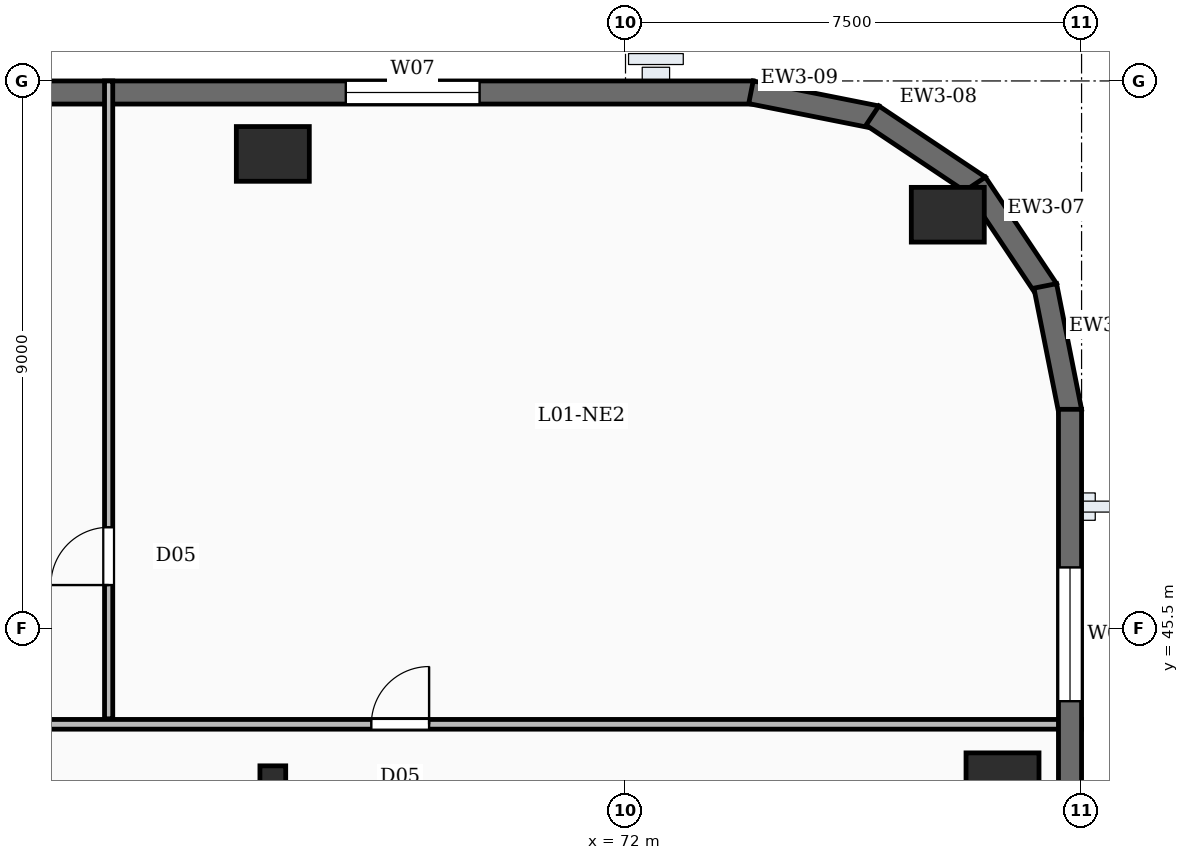
"""IFC4 building model, lengths in metres.
Left out: names, types, materials, properties, quantities, classifications, styles, units other than length and angle.
Written with IfcOpenShell. Run it as: python <this file> out.ifc"""

import sys

from ifc_helpers import new_model, si_unit, direction, frame, frame_2d, origin, origin_2d, place, context, subcontext, project, spatial, rectangle, i_section, extrude, element, fill, save


model = new_model("IFC4")
c1 = context("Model", 3, precision=1e-05, world=origin(), true_north=direction((0.0, 1.0)))
c2 = subcontext(c1, "Body", "Model", "MODEL_VIEW")
j1 = project(units=[si_unit("LENGTHUNIT", "METRE"), si_unit("PLANEANGLEUNIT", "RADIAN")], contexts=[c1])
p1 = place(None, origin())
s1 = spatial("IfcSite", under=j1, at=p1, CompositionType="ELEMENT")
p2 = place(p1, origin())
s2 = spatial("IfcBuilding", under=s1, at=p2, CompositionType="ELEMENT")
p3 = place(p2, frame((0.0, 0.0, 8.0)))
s3 = spatial("IfcBuildingStorey", under=s2, at=p3, CompositionType="ELEMENT", Elevation=8.0)
for number, where, z_axis, x_axis in (
    (1, (78.2, 43.0, -0.35), (0.0, 0.0, 1.0), (1.0, 0.0, 0.0)),
    (2, (77.3, 52.3, -0.35), (0.0, 0.0, 1.0), (1.0, 0.0, 0.0)),
    (3, (66.2, 53.3, -0.35), (0.0, 0.0, 1.0), (1.0, 0.0, 0.0)),
):
    element("IfcColumn", number, at=place(p3, frame(where, z_axis=z_axis, x_axis=x_axis)), inside=s3, PredefinedType="COLUMN", context=c2, shape_type="SweptSolid", body=[
        extrude(rectangle(XDim=1.2, YDim=0.9, at=origin_2d()), origin(), (0.0, 0.0, 1.0), 5.0),
    ])
p4 = place(p3, frame((66.2, 43.0, -0.35), z_axis=(0.0, 0.0, 1.0), x_axis=(1.0, 0.0, 0.0)))
e4 = element("IfcColumn", 4, at=p4, inside=s3, PredefinedType="COLUMN", context=c2, shape_type="SweptSolid", body=[
    extrude(i_section(OverallWidth=0.424, OverallDepth=0.474, WebThickness=0.048, FlangeThickness=0.077, FilletRadius=0.02, at=origin_2d()), origin(), (0.0, 0.0, 1.0), 5.0),
])
p5 = place(p3, frame((79.31, 49.1, 0.0), z_axis=(0.0, 0.0, 1.0), x_axis=(0.0, -1.0, 0.0)))
e5 = element("IfcWall", 5, at=p5, inside=s3, PredefinedType="SOLIDWALL", context=c2, shape_type="SweptSolid", body=[
    extrude(rectangle(XDim=43.7, YDim=0.38, at=frame_2d((21.85, 0.0))), origin(), (0.0, 0.0, 1.0), 4.65),
])
p6 = place(p5, frame((2.6, 0.0, 0.95)))
e6 = element("IfcOpeningElement", 6, at=p6, cuts=e5, PredefinedType="OPENING", context=c2, shape_type="SweptSolid", body=[
    extrude(rectangle(XDim=2.2, YDim=2.5, at=frame_2d((1.1, 1.25))), frame((0.0, 0.2, 0.0), z_axis=(0.0, -1.0, 0.0), x_axis=(1.0, 0.0, 0.0)), (0.0, 0.0, 1.0), 0.4),
])
p7 = place(p5, frame((8.0, 0.0, 0.95)))
e7 = element("IfcOpeningElement", 7, at=p7, cuts=e5, PredefinedType="OPENING", context=c2, shape_type="SweptSolid", body=[
    extrude(rectangle(XDim=2.2, YDim=2.5, at=frame_2d((1.1, 1.25))), frame((0.0, 0.2, 0.0), z_axis=(0.0, -1.0, 0.0), x_axis=(1.0, 0.0, 0.0)), (0.0, 0.0, 1.0), 0.4),
])
p8 = place(p5, frame((29.6, 0.0, 0.95)))
e8 = element("IfcOpeningElement", 8, at=p8, cuts=e5, PredefinedType="OPENING", context=c2, shape_type="SweptSolid", body=[
    extrude(rectangle(XDim=2.2, YDim=2.5, at=frame_2d((1.1, 1.25))), frame((0.0, 0.2, 0.0), z_axis=(0.0, -1.0, 0.0), x_axis=(1.0, 0.0, 0.0)), (0.0, 0.0, 1.0), 0.4),
])
for number, where, z_axis, x_axis in (
    (9, (78.903, 51.129, 0.0), (0.0, 0.0, 1.0), (0.195, -0.981, 0.0)),
    (10, (77.76, 52.813, 0.0), (0.0, 0.0, 1.0), (0.556, -0.832, 0.0)),
    (11, (76.061, 53.931, 0.0), (0.0, 0.0, 1.0), (0.832, -0.556, 0.0)),
    (12, (74.063, 54.314, 0.0), (0.0, 0.0, 1.0), (0.981, -0.195, 0.0)),
):
    element("IfcWall", number, at=place(p3, frame(where, z_axis=z_axis, x_axis=x_axis)), inside=s3, PredefinedType="SOLIDWALL", context=c2, shape_type="SweptSolid", body=[
        extrude(rectangle(XDim=2.107, YDim=0.38, at=frame_2d((1.053, 0.0))), origin(), (0.0, 0.0, 1.0), 4.65),
    ])
p9 = place(p3, frame((5.4, 54.31, 0.0), z_axis=(0.0, 0.0, 1.0), x_axis=(1.0, 0.0, 0.0)))
e13 = element("IfcWall", 13, at=p9, inside=s3, PredefinedType="SOLIDWALL", context=c2, shape_type="SweptSolid", body=[
    extrude(rectangle(XDim=68.7, YDim=0.38, at=frame_2d((34.35, 0.0))), origin(), (0.0, 0.0, 1.0), 4.65),
])
p10 = place(p9, frame((13.4, 0.0, 0.95)))
e14 = element("IfcOpeningElement", 14, at=p10, cuts=e13, PredefinedType="OPENING", context=c2, shape_type="SweptSolid", body=[
    extrude(rectangle(XDim=2.2, YDim=2.5, at=frame_2d((1.1, 1.25))), frame((0.0, 0.2, 0.0), z_axis=(0.0, -1.0, 0.0), x_axis=(1.0, 0.0, 0.0)), (0.0, 0.0, 1.0), 0.4),
])
p11 = place(p9, frame((24.2, 0.0, 0.95)))
e15 = element("IfcOpeningElement", 15, at=p11, cuts=e13, PredefinedType="OPENING", context=c2, shape_type="SweptSolid", body=[
    extrude(rectangle(XDim=2.2, YDim=2.5, at=frame_2d((1.1, 1.25))), frame((0.0, 0.2, 0.0), z_axis=(0.0, -1.0, 0.0), x_axis=(1.0, 0.0, 0.0)), (0.0, 0.0, 1.0), 0.4),
])
p12 = place(p9, frame((35.0, 0.0, 0.95)))
e16 = element("IfcOpeningElement", 16, at=p12, cuts=e13, PredefinedType="OPENING", context=c2, shape_type="SweptSolid", body=[
    extrude(rectangle(XDim=2.2, YDim=2.5, at=frame_2d((1.1, 1.25))), frame((0.0, 0.2, 0.0), z_axis=(0.0, -1.0, 0.0), x_axis=(1.0, 0.0, 0.0)), (0.0, 0.0, 1.0), 0.4),
])
p13 = place(p9, frame((40.4, 0.0, 0.95)))
e17 = element("IfcOpeningElement", 17, at=p13, cuts=e13, PredefinedType="OPENING", context=c2, shape_type="SweptSolid", body=[
    extrude(rectangle(XDim=2.2, YDim=2.5, at=frame_2d((1.1, 1.25))), frame((0.0, 0.2, 0.0), z_axis=(0.0, -1.0, 0.0), x_axis=(1.0, 0.0, 0.0)), (0.0, 0.0, 1.0), 0.4),
])
p14 = place(p9, frame((51.2, 0.0, 0.95)))
e18 = element("IfcOpeningElement", 18, at=p14, cuts=e13, PredefinedType="OPENING", context=c2, shape_type="SweptSolid", body=[
    extrude(rectangle(XDim=2.2, YDim=2.5, at=frame_2d((1.1, 1.25))), frame((0.0, 0.2, 0.0), z_axis=(0.0, -1.0, 0.0), x_axis=(1.0, 0.0, 0.0)), (0.0, 0.0, 1.0), 0.4),
])
p15 = place(p9, frame((62.0, 0.0, 0.95)))
e19 = element("IfcOpeningElement", 19, at=p15, cuts=e13, PredefinedType="OPENING", context=c2, shape_type="SweptSolid", body=[
    extrude(rectangle(XDim=2.2, YDim=2.5, at=frame_2d((1.1, 1.25))), frame((0.0, 0.2, 0.0), z_axis=(0.0, -1.0, 0.0), x_axis=(1.0, 0.0, 0.0)), (0.0, 0.0, 1.0), 0.4),
])
p16 = place(p3, frame((63.5, 44.01, 0.0), z_axis=(0.0, 0.0, 1.0), x_axis=(0.0, 1.0, 0.0)))
e20 = element("IfcWall", 20, at=p16, inside=s3, PredefinedType="PARTITIONING", context=c2, shape_type="SweptSolid", body=[
    extrude(rectangle(XDim=10.49, YDim=0.135, at=frame_2d((5.245, 0.0))), origin(), (0.0, 0.0, 1.0), 3.71),
])
p17 = place(p16, frame((2.2, 0.0, 0.0)))
e21 = element("IfcOpeningElement", 21, at=p17, cuts=e20, PredefinedType="OPENING", context=c2, shape_type="SweptSolid", body=[
    extrude(rectangle(XDim=0.95, YDim=2.15, at=frame_2d((0.475, 1.075))), frame((0.0, 0.077, 0.0), z_axis=(0.0, -1.0, 0.0), x_axis=(1.0, 0.0, 0.0)), (0.0, 0.0, 1.0), 0.155),
])
p18 = place(p3, frame((49.8, 43.92, 0.0), z_axis=(0.0, 0.0, 1.0), x_axis=(1.0, 0.0, 0.0)))
e22 = element("IfcWall", 22, at=p18, inside=s3, PredefinedType="PARTITIONING", context=c2, shape_type="SweptSolid", body=[
    extrude(rectangle(XDim=29.7, YDim=0.16, at=frame_2d((14.85, 0.0))), origin(), (0.0, 0.0, 1.0), 3.71),
])
p19 = place(p18, frame((6.37, 0.0, 0.0)))
e23 = element("IfcOpeningElement", 23, at=p19, cuts=e22, PredefinedType="OPENING", context=c2, shape_type="SweptSolid", body=[
    extrude(rectangle(XDim=0.95, YDim=2.15, at=frame_2d((0.475, 1.075))), frame((0.0, 0.09, 0.0), z_axis=(0.0, -1.0, 0.0), x_axis=(1.0, 0.0, 0.0)), (0.0, 0.0, 1.0), 0.18),
])
p20 = place(p18, frame((18.02, 0.0, 0.0)))
e24 = element("IfcOpeningElement", 24, at=p20, cuts=e22, PredefinedType="OPENING", context=c2, shape_type="SweptSolid", body=[
    extrude(rectangle(XDim=0.95, YDim=2.15, at=frame_2d((0.475, 1.075))), frame((0.0, 0.09, 0.0), z_axis=(0.0, -1.0, 0.0), x_axis=(1.0, 0.0, 0.0)), (0.0, 0.0, 1.0), 0.18),
])
p21 = place(p6, origin())
e25 = element("IfcWindow", 25, at=p21, inside=s3, PartitioningType="DOUBLE_PANEL_VERTICAL", PredefinedType="WINDOW", context=c2, shape_type="SweptSolid", body=[
    extrude(rectangle(XDim=2.2, YDim=2.5, at=frame_2d((1.1, 1.25))), frame((0.0, 0.03, 0.0), z_axis=(0.0, -1.0, 0.0), x_axis=(1.0, 0.0, 0.0)), (0.0, 0.0, 1.0), 0.06),
])
fill(e6, e25)
p22 = place(p15, origin())
e26 = element("IfcWindow", 26, at=p22, inside=s3, PartitioningType="DOUBLE_PANEL_VERTICAL", PredefinedType="WINDOW", context=c2, shape_type="SweptSolid", body=[
    extrude(rectangle(XDim=2.2, YDim=2.5, at=frame_2d((1.1, 1.25))), frame((0.0, 0.03, 0.0), z_axis=(0.0, -1.0, 0.0), x_axis=(1.0, 0.0, 0.0)), (0.0, 0.0, 1.0), 0.06),
])
fill(e19, e26)
p23 = place(p17, origin())
e27 = element("IfcDoor", 27, at=p23, inside=s3, OperationType="SINGLE_SWING_LEFT", PredefinedType="DOOR", context=c2, shape_type="SweptSolid", body=[
    extrude(rectangle(XDim=0.95, YDim=2.15, at=frame_2d((0.475, 1.075))), frame((0.0, 0.025, 0.0), z_axis=(0.0, -1.0, 0.0), x_axis=(1.0, 0.0, 0.0)), (0.0, 0.0, 1.0), 0.05),
])
fill(e21, e27)
p24 = place(p20, origin())
e28 = element("IfcDoor", 28, at=p24, inside=s3, OperationType="SINGLE_SWING_RIGHT", PredefinedType="DOOR", context=c2, shape_type="SweptSolid", body=[
    extrude(rectangle(XDim=0.95, YDim=2.15, at=frame_2d((0.475, 1.075))), frame((0.0, 0.025, 0.0), z_axis=(0.0, -1.0, 0.0), x_axis=(1.0, 0.0, 0.0)), (0.0, 0.0, 1.0), 0.05),
])
fill(e24, e28)
save(model, sys.argv[1])
